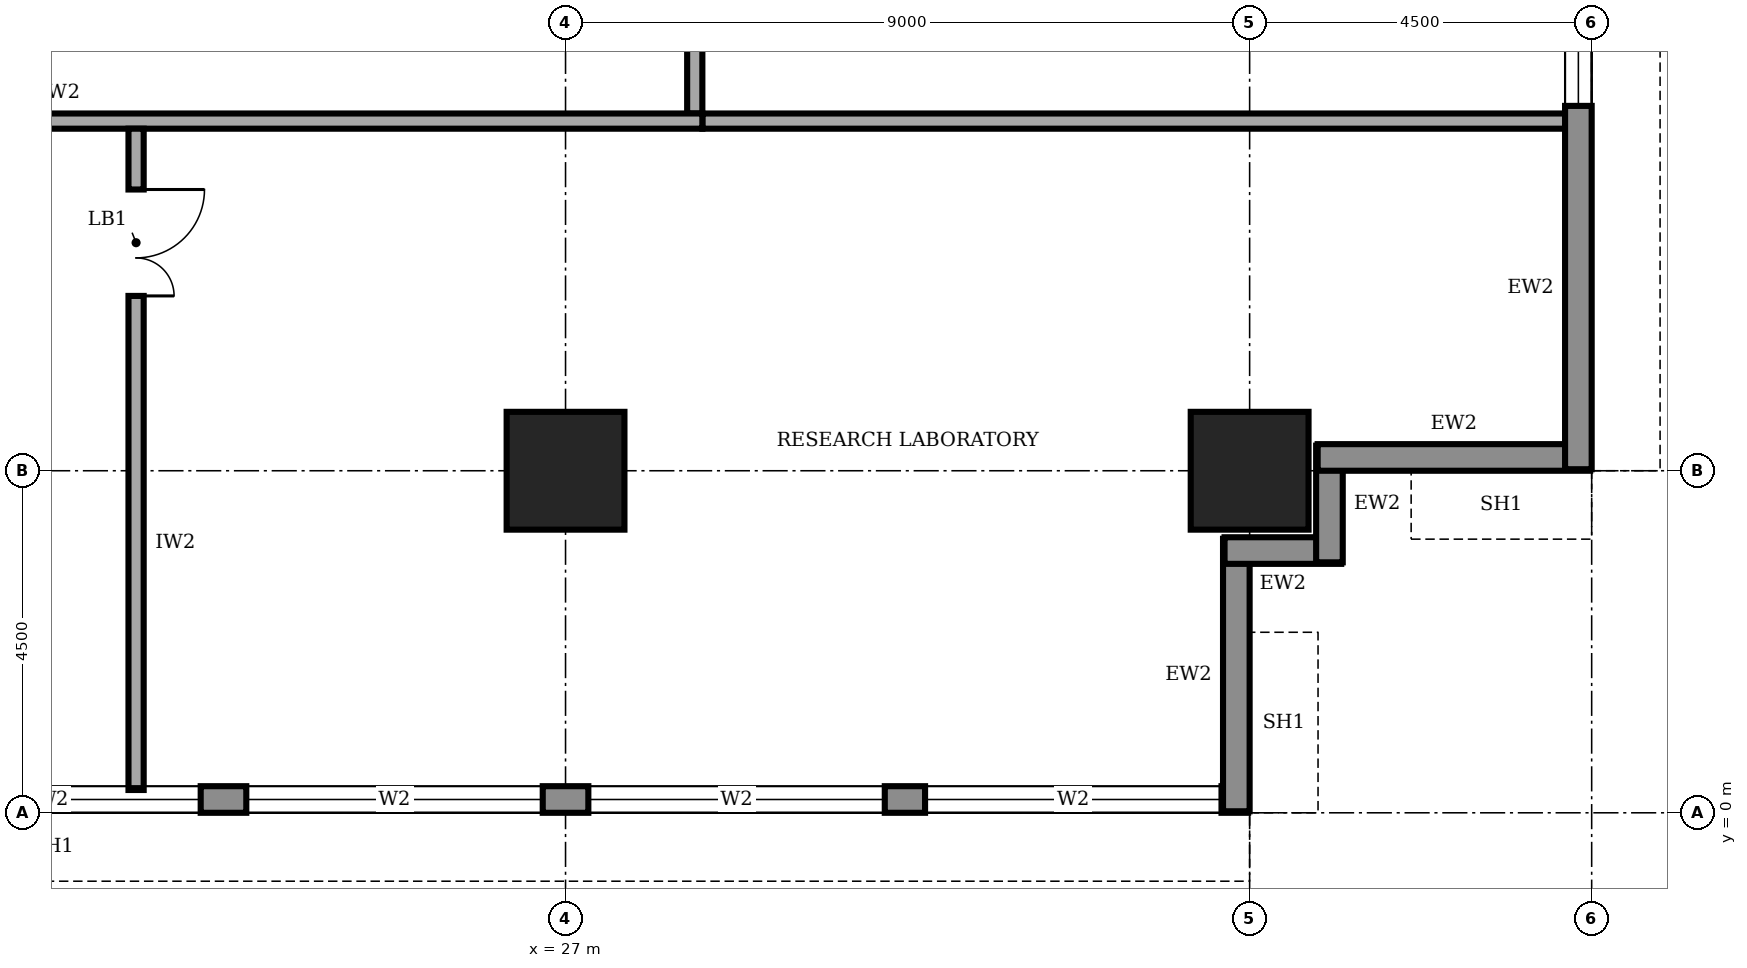
"""IFC4 building model, lengths in metres.
Left out: names, types, materials, properties, quantities, classifications, styles, units other than length and angle.
Written with IfcOpenShell. Run it as: python <this file> out.ifc"""

import sys

from ifc_helpers import new_model, si_unit, direction, frame, frame_2d, origin, origin_2d, place, context, subcontext, project, spatial, rectangle, extrude, element, fill, save


model = new_model("IFC4")
c1 = context("Model", 3, precision=1e-05, world=origin(), true_north=direction((0.0, 1.0)))
c2 = subcontext(c1, "Body", "Model", "MODEL_VIEW")
j1 = project(units=[si_unit("LENGTHUNIT", "METRE"), si_unit("PLANEANGLEUNIT", "RADIAN")], contexts=[c1])
p1 = place(None, origin())
s1 = spatial("IfcSite", under=j1, at=p1, CompositionType="ELEMENT")
p2 = place(p1, origin())
s2 = spatial("IfcBuilding", under=s1, at=p2, CompositionType="ELEMENT")
p3 = place(p2, frame((0.0, 0.0, 237.0)))
s3 = spatial("IfcBuildingStorey", under=s2, at=p3, CompositionType="ELEMENT", Elevation=237.0)
for number, where, z_axis, x_axis in (
    (1, (27.0, 4.5, 0.0), (0.0, 0.0, 1.0), (1.0, 0.0, 0.0)),
    (2, (36.0, 4.5, 0.0), (0.0, 0.0, 1.0), (1.0, 0.0, 0.0)),
):
    element("IfcColumn", number, at=place(p3, frame(where, z_axis=z_axis, x_axis=x_axis)), inside=s3, PredefinedType="COLUMN", context=c2, shape_type="SweptSolid", body=[
        extrude(rectangle(XDim=1.55, YDim=1.55, at=origin_2d()), origin(), (0.0, 0.0, 1.0), 4.0),
    ])
p4 = place(p3, frame((4.52, 0.175, 0.0), z_axis=(0.0, 0.0, 1.0), x_axis=(1.0, 0.0, 0.0)))
e3 = element("IfcWall", 3, at=p4, inside=s3, PredefinedType="STANDARD", context=c2, shape_type="SweptSolid", body=[
    extrude(rectangle(XDim=31.46, YDim=0.35, at=frame_2d((15.73, 0.0))), origin(), (0.0, 0.0, 1.0), 3.75),
])
p5 = place(p4, frame((4.78, 0.0, 0.6)))
e4 = element("IfcOpeningElement", 4, at=p5, cuts=e3, PredefinedType="OPENING", context=c2, shape_type="SweptSolid", body=[
    extrude(rectangle(XDim=3.9, YDim=2.6, at=frame_2d((1.95, 1.3))), frame((0.0, 0.185, 0.0), z_axis=(0.0, -1.0, 0.0), x_axis=(1.0, 0.0, 0.0)), (0.0, 0.0, 1.0), 0.37),
])
p6 = place(p4, frame((9.28, 0.0, 0.6)))
e5 = element("IfcOpeningElement", 5, at=p6, cuts=e3, PredefinedType="OPENING", context=c2, shape_type="SweptSolid", body=[
    extrude(rectangle(XDim=3.9, YDim=2.6, at=frame_2d((1.95, 1.3))), frame((0.0, 0.185, 0.0), z_axis=(0.0, -1.0, 0.0), x_axis=(1.0, 0.0, 0.0)), (0.0, 0.0, 1.0), 0.37),
])
p7 = place(p4, frame((13.78, 0.0, 0.6)))
e6 = element("IfcOpeningElement", 6, at=p7, cuts=e3, PredefinedType="OPENING", context=c2, shape_type="SweptSolid", body=[
    extrude(rectangle(XDim=3.9, YDim=2.6, at=frame_2d((1.95, 1.3))), frame((0.0, 0.185, 0.0), z_axis=(0.0, -1.0, 0.0), x_axis=(1.0, 0.0, 0.0)), (0.0, 0.0, 1.0), 0.37),
])
p8 = place(p4, frame((18.28, 0.0, 0.6)))
e7 = element("IfcOpeningElement", 7, at=p8, cuts=e3, PredefinedType="OPENING", context=c2, shape_type="SweptSolid", body=[
    extrude(rectangle(XDim=3.9, YDim=2.6, at=frame_2d((1.95, 1.3))), frame((0.0, 0.185, 0.0), z_axis=(0.0, -1.0, 0.0), x_axis=(1.0, 0.0, 0.0)), (0.0, 0.0, 1.0), 0.37),
])
p9 = place(p4, frame((22.78, 0.0, 0.6)))
e8 = element("IfcOpeningElement", 8, at=p9, cuts=e3, PredefinedType="OPENING", context=c2, shape_type="SweptSolid", body=[
    extrude(rectangle(XDim=3.9, YDim=2.6, at=frame_2d((1.95, 1.3))), frame((0.0, 0.185, 0.0), z_axis=(0.0, -1.0, 0.0), x_axis=(1.0, 0.0, 0.0)), (0.0, 0.0, 1.0), 0.37),
])
p10 = place(p4, frame((27.21, 0.0, 0.6)))
e9 = element("IfcOpeningElement", 9, at=p10, cuts=e3, PredefinedType="OPENING", context=c2, shape_type="SweptSolid", body=[
    extrude(rectangle(XDim=3.9, YDim=2.6, at=frame_2d((1.95, 1.3))), frame((0.0, 0.185, 0.0), z_axis=(0.0, -1.0, 0.0), x_axis=(1.0, 0.0, 0.0)), (0.0, 0.0, 1.0), 0.37),
])
p11 = place(p3, frame((35.825, 0.02, 0.0), z_axis=(0.0, 0.0, 1.0), x_axis=(0.0, 1.0, 0.0)))
e10 = element("IfcWall", 10, at=p11, inside=s3, PredefinedType="STANDARD", context=c2, shape_type="SweptSolid", body=[
    extrude(rectangle(XDim=3.585, YDim=0.35, at=frame_2d((1.792, 0.0))), origin(), (0.0, 0.0, 1.0), 2.85),
])
for number, where, z_axis, x_axis in (
    (11, (35.67, 3.45, 0.0), (0.0, 0.0, 1.0), (1.0, 0.0, 0.0)),
    (12, (37.05, 3.295, 0.0), (0.0, 0.0, 1.0), (0.0, 1.0, 0.0)),
):
    element("IfcWall", number, at=place(p3, frame(where, z_axis=z_axis, x_axis=x_axis)), inside=s3, PredefinedType="STANDARD", context=c2, shape_type="SweptSolid", body=[
        extrude(rectangle(XDim=1.535, YDim=0.35, at=frame_2d((0.768, 0.0))), origin(), (0.0, 0.0, 1.0), 3.75),
    ])
p12 = place(p3, frame((36.895, 4.675, 0.0), z_axis=(0.0, 0.0, 1.0), x_axis=(1.0, 0.0, 0.0)))
e13 = element("IfcWall", 13, at=p12, inside=s3, PredefinedType="STANDARD", context=c2, shape_type="SweptSolid", body=[
    extrude(rectangle(XDim=3.585, YDim=0.35, at=frame_2d((1.792, 0.0))), origin(), (0.0, 0.0, 1.0), 2.85),
])
p13 = place(p3, frame((40.325, 4.52, 0.0), z_axis=(0.0, 0.0, 1.0), x_axis=(0.0, 1.0, 0.0)))
e14 = element("IfcWall", 14, at=p13, inside=s3, PredefinedType="STANDARD", context=c2, shape_type="SweptSolid", body=[
    extrude(rectangle(XDim=31.46, YDim=0.35, at=frame_2d((15.73, 0.0))), origin(), (0.0, 0.0, 1.0), 3.75),
])
p14 = place(p13, frame((4.78, 0.0, 0.6)))
e15 = element("IfcOpeningElement", 15, at=p14, cuts=e14, PredefinedType="OPENING", context=c2, shape_type="SweptSolid", body=[
    extrude(rectangle(XDim=3.9, YDim=2.6, at=frame_2d((1.95, 1.3))), frame((0.0, 0.185, 0.0), z_axis=(0.0, -1.0, 0.0), x_axis=(1.0, 0.0, 0.0)), (0.0, 0.0, 1.0), 0.37),
])
p15 = place(p13, frame((9.28, 0.0, 0.6)))
e16 = element("IfcOpeningElement", 16, at=p15, cuts=e14, PredefinedType="OPENING", context=c2, shape_type="SweptSolid", body=[
    extrude(rectangle(XDim=3.9, YDim=2.6, at=frame_2d((1.95, 1.3))), frame((0.0, 0.185, 0.0), z_axis=(0.0, -1.0, 0.0), x_axis=(1.0, 0.0, 0.0)), (0.0, 0.0, 1.0), 0.37),
])
p16 = place(p13, frame((13.78, 0.0, 0.6)))
e17 = element("IfcOpeningElement", 17, at=p16, cuts=e14, PredefinedType="OPENING", context=c2, shape_type="SweptSolid", body=[
    extrude(rectangle(XDim=3.9, YDim=2.6, at=frame_2d((1.95, 1.3))), frame((0.0, 0.185, 0.0), z_axis=(0.0, -1.0, 0.0), x_axis=(1.0, 0.0, 0.0)), (0.0, 0.0, 1.0), 0.37),
])
p17 = place(p13, frame((18.28, 0.0, 0.6)))
e18 = element("IfcOpeningElement", 18, at=p17, cuts=e14, PredefinedType="OPENING", context=c2, shape_type="SweptSolid", body=[
    extrude(rectangle(XDim=3.9, YDim=2.6, at=frame_2d((1.95, 1.3))), frame((0.0, 0.185, 0.0), z_axis=(0.0, -1.0, 0.0), x_axis=(1.0, 0.0, 0.0)), (0.0, 0.0, 1.0), 0.37),
])
p18 = place(p13, frame((22.78, 0.0, 0.6)))
e19 = element("IfcOpeningElement", 19, at=p18, cuts=e14, PredefinedType="OPENING", context=c2, shape_type="SweptSolid", body=[
    extrude(rectangle(XDim=3.9, YDim=2.6, at=frame_2d((1.95, 1.3))), frame((0.0, 0.185, 0.0), z_axis=(0.0, -1.0, 0.0), x_axis=(1.0, 0.0, 0.0)), (0.0, 0.0, 1.0), 0.37),
])
p19 = place(p13, frame((27.21, 0.0, 0.6)))
e20 = element("IfcOpeningElement", 20, at=p19, cuts=e14, PredefinedType="OPENING", context=c2, shape_type="SweptSolid", body=[
    extrude(rectangle(XDim=3.9, YDim=2.6, at=frame_2d((1.95, 1.3))), frame((0.0, 0.185, 0.0), z_axis=(0.0, -1.0, 0.0), x_axis=(1.0, 0.0, 0.0)), (0.0, 0.0, 1.0), 0.37),
])
p20 = place(p3, frame((11.9, 9.1, 0.0), z_axis=(0.0, 0.0, 1.0), x_axis=(1.0, 0.0, 0.0)))
e21 = element("IfcWall", 21, at=p20, inside=s3, PredefinedType="SOLIDWALL", context=c2, shape_type="SweptSolid", body=[
    extrude(rectangle(XDim=16.9, YDim=0.2, at=frame_2d((8.45, 0.0))), origin(), (0.0, 0.0, 1.0), 3.75),
])
p21 = place(p3, frame((28.7, 9.2, 0.0), z_axis=(0.0, 0.0, 1.0), x_axis=(0.0, 1.0, 0.0)))
e22 = element("IfcWall", 22, at=p21, inside=s3, PredefinedType="SOLIDWALL", context=c2, shape_type="SweptSolid", body=[
    extrude(rectangle(XDim=23.05, YDim=0.2, at=frame_2d((11.525, 0.0))), origin(), (0.0, 0.0, 1.0), 3.75),
])
p22 = place(p21, frame((3.4, 0.0, 0.0)))
e23 = element("IfcOpeningElement", 23, at=p22, cuts=e22, PredefinedType="OPENING", context=c2, shape_type="SweptSolid", body=[
    extrude(rectangle(XDim=1.8, YDim=2.1, at=frame_2d((0.9, 1.05))), frame((0.0, 0.11, 0.0), z_axis=(0.0, -1.0, 0.0), x_axis=(1.0, 0.0, 0.0)), (0.0, 0.0, 1.0), 0.22),
])
p23 = place(p21, frame((12.4, 0.0, 0.0)))
e24 = element("IfcOpeningElement", 24, at=p23, cuts=e22, PredefinedType="OPENING", context=c2, shape_type="SweptSolid", body=[
    extrude(rectangle(XDim=1.8, YDim=2.1, at=frame_2d((0.9, 1.05))), frame((0.0, 0.11, 0.0), z_axis=(0.0, -1.0, 0.0), x_axis=(1.0, 0.0, 0.0)), (0.0, 0.0, 1.0), 0.22),
])
p24 = place(p21, frame((19.925, 0.0, 0.0)))
e25 = element("IfcOpeningElement", 25, at=p24, cuts=e22, PredefinedType="OPENING", context=c2, shape_type="SweptSolid", body=[
    extrude(rectangle(XDim=1.0, YDim=2.1, at=frame_2d((0.5, 1.05))), frame((0.0, 0.11, 0.0), z_axis=(0.0, -1.0, 0.0), x_axis=(1.0, 0.0, 0.0)), (0.0, 0.0, 1.0), 0.22),
])
p25 = place(p3, frame((21.35, 9.0, 0.0), z_axis=(0.0, 0.0, 1.0), x_axis=(0.0, -1.0, 0.0)))
e26 = element("IfcWall", 26, at=p25, inside=s3, PredefinedType="SOLIDWALL", context=c2, shape_type="SweptSolid", body=[
    extrude(rectangle(XDim=8.7, YDim=0.2, at=frame_2d((4.35, 0.0))), origin(), (0.0, 0.0, 1.0), 3.75),
])
p26 = place(p25, frame((0.8, 0.0, 0.0)))
e27 = element("IfcOpeningElement", 27, at=p26, cuts=e26, PredefinedType="OPENING", context=c2, shape_type="SweptSolid", body=[
    extrude(rectangle(XDim=1.4, YDim=2.1, at=frame_2d((0.7, 1.05))), frame((0.0, 0.11, 0.0), z_axis=(0.0, -1.0, 0.0), x_axis=(1.0, 0.0, 0.0)), (0.0, 0.0, 1.0), 0.22),
])
p27 = place(p3, frame((28.8, 9.1, 0.0), z_axis=(0.0, 0.0, 1.0), x_axis=(1.0, 0.0, 0.0)))
e28 = element("IfcWall", 28, at=p27, inside=s3, PredefinedType="SOLIDWALL", context=c2, shape_type="SweptSolid", body=[
    extrude(rectangle(XDim=11.4, YDim=0.2, at=frame_2d((5.7, 0.0))), origin(), (0.0, 0.0, 1.0), 3.75),
])
p28 = place(p7, origin())
e29 = element("IfcWindow", 29, at=p28, inside=s3, PartitioningType="SINGLE_PANEL", PredefinedType="WINDOW", context=c2, shape_type="SweptSolid", body=[
    extrude(rectangle(XDim=3.9, YDim=2.6, at=frame_2d((1.95, 1.3))), frame((0.0, 0.03, 0.0), z_axis=(0.0, -1.0, 0.0), x_axis=(1.0, 0.0, 0.0)), (0.0, 0.0, 1.0), 0.06),
])
fill(e6, e29)
p29 = place(p8, origin())
e30 = element("IfcWindow", 30, at=p29, inside=s3, PartitioningType="SINGLE_PANEL", PredefinedType="WINDOW", context=c2, shape_type="SweptSolid", body=[
    extrude(rectangle(XDim=3.9, YDim=2.6, at=frame_2d((1.95, 1.3))), frame((0.0, 0.03, 0.0), z_axis=(0.0, -1.0, 0.0), x_axis=(1.0, 0.0, 0.0)), (0.0, 0.0, 1.0), 0.06),
])
fill(e7, e30)
p30 = place(p9, origin())
e31 = element("IfcWindow", 31, at=p30, inside=s3, PartitioningType="SINGLE_PANEL", PredefinedType="WINDOW", context=c2, shape_type="SweptSolid", body=[
    extrude(rectangle(XDim=3.9, YDim=2.6, at=frame_2d((1.95, 1.3))), frame((0.0, 0.03, 0.0), z_axis=(0.0, -1.0, 0.0), x_axis=(1.0, 0.0, 0.0)), (0.0, 0.0, 1.0), 0.06),
])
fill(e8, e31)
p31 = place(p10, origin())
e32 = element("IfcWindow", 32, at=p31, inside=s3, PartitioningType="SINGLE_PANEL", PredefinedType="WINDOW", context=c2, shape_type="SweptSolid", body=[
    extrude(rectangle(XDim=3.9, YDim=2.6, at=frame_2d((1.95, 1.3))), frame((0.0, 0.03, 0.0), z_axis=(0.0, -1.0, 0.0), x_axis=(1.0, 0.0, 0.0)), (0.0, 0.0, 1.0), 0.06),
])
fill(e9, e32)
p32 = place(p14, origin())
e33 = element("IfcWindow", 33, at=p32, inside=s3, PartitioningType="SINGLE_PANEL", PredefinedType="WINDOW", context=c2, shape_type="SweptSolid", body=[
    extrude(rectangle(XDim=3.9, YDim=2.6, at=frame_2d((1.95, 1.3))), frame((0.0, 0.03, 0.0), z_axis=(0.0, -1.0, 0.0), x_axis=(1.0, 0.0, 0.0)), (0.0, 0.0, 1.0), 0.06),
])
fill(e15, e33)
p33 = place(p26, origin())
e34 = element("IfcDoor", 34, at=p33, inside=s3, OperationType="DOUBLE_DOOR_SINGLE_SWING", PredefinedType="DOOR", context=c2, shape_type="SweptSolid", body=[
    extrude(rectangle(XDim=1.4, YDim=2.1, at=frame_2d((0.7, 1.05))), frame((0.0, 0.025, 0.0), z_axis=(0.0, -1.0, 0.0), x_axis=(1.0, 0.0, 0.0)), (0.0, 0.0, 1.0), 0.05),
])
fill(e27, e34)
save(model, sys.argv[1])
